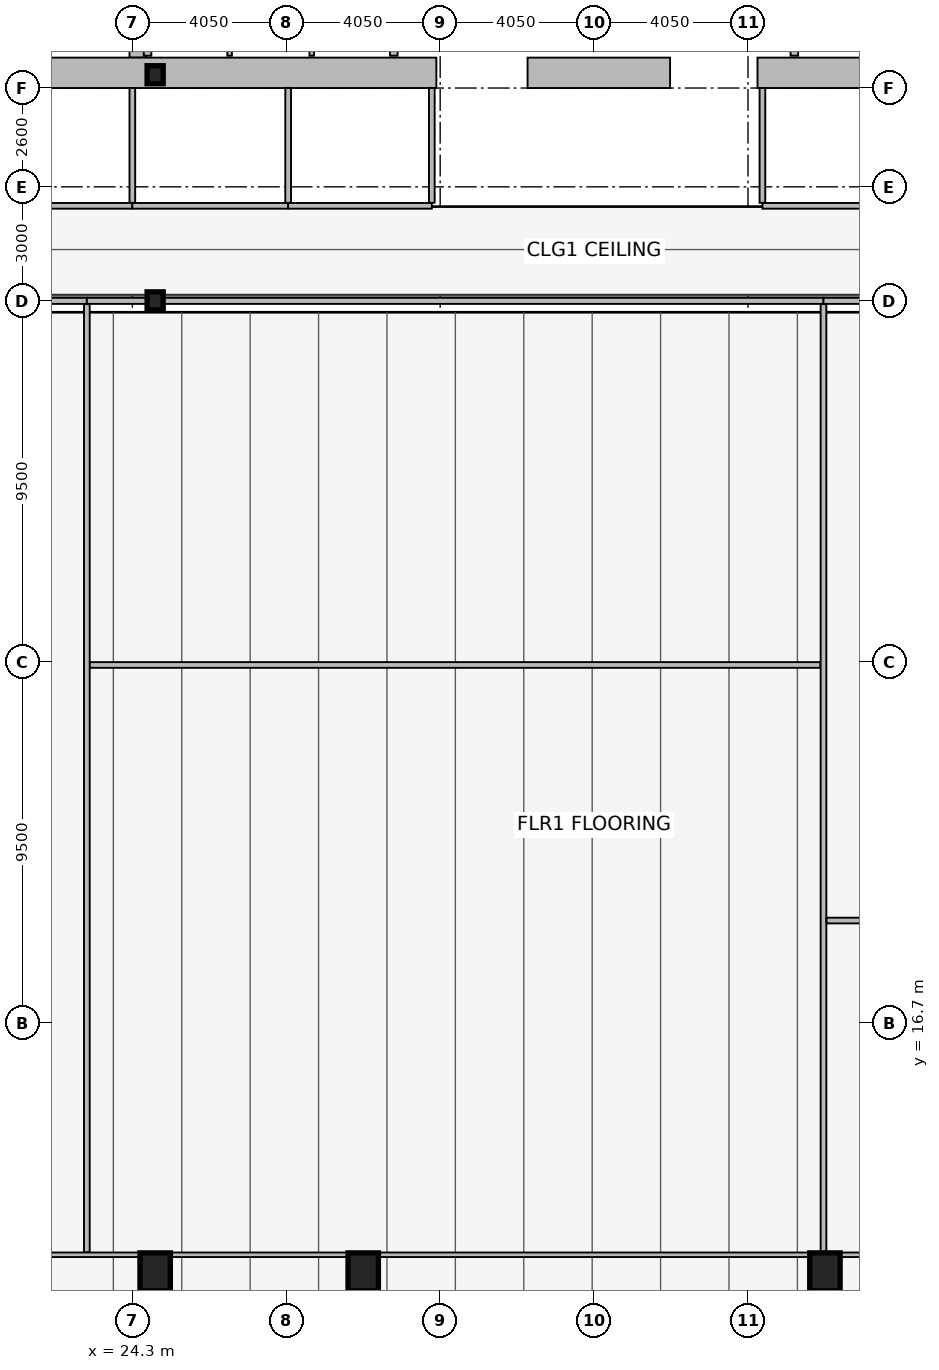
"""IFC4 building model, lengths in metres.
Left out: names, types, materials, properties, quantities, classifications, styles, units other than length and angle.
Written with IfcOpenShell. Run it as: python <this file> out.ifc"""

import sys

from ifc_helpers import new_model, si_unit, direction, frame, frame_2d, origin, origin_2d, place, context, subcontext, project, spatial, rectangle, hollow_rectangle, i_section, extrude, element, fill, save


model = new_model("IFC4")
c1 = context("Model", 3, precision=1e-05, world=origin(), true_north=direction((0.0, 1.0)))
c2 = subcontext(c1, "Body", "Model", "MODEL_VIEW")
j1 = project(units=[si_unit("LENGTHUNIT", "METRE"), si_unit("PLANEANGLEUNIT", "RADIAN")], contexts=[c1])
p1 = place(None, origin())
s1 = spatial("IfcSite", under=j1, at=p1, CompositionType="ELEMENT")
p2 = place(p1, origin())
s2 = spatial("IfcBuilding", under=s1, at=p2, CompositionType="ELEMENT")
p3 = place(p2, frame((0.0, 0.0, 25.8)))
s3 = spatial("IfcBuildingStorey", under=s2, at=p3, CompositionType="ELEMENT", Elevation=25.8)
p4 = place(p3, frame((24.45, 42.1, 0.0), z_axis=(0.0, 0.0, 1.0), x_axis=(0.0, 1.0, 0.0)))
e1 = element("IfcWall", 1, at=p4, inside=s3, PredefinedType="SHEAR", context=c2, shape_type="SweptSolid", body=[
    extrude(rectangle(XDim=10.8, YDim=0.45, at=frame_2d((5.4, 0.0))), origin(), (0.0, 0.0, 1.0), 3.82),
])
p5 = place(p3, frame((32.3, 41.7, 0.0), z_axis=(0.0, 0.0, 1.0), x_axis=(-1.0, 0.0, 0.0)))
e2 = element("IfcWall", 2, at=p5, inside=s3, PredefinedType="SHEAR", context=c2, shape_type="SweptSolid", body=[
    extrude(rectangle(XDim=11.45, YDim=0.8, at=frame_2d((5.725, 0.0))), origin(), (0.0, 0.0, 1.0), 3.82),
])
p6 = place(p3, frame((38.45, 41.7, 0.0), z_axis=(0.0, 0.0, 1.0), x_axis=(-1.0, 0.0, 0.0)))
e3 = element("IfcWall", 3, at=p6, inside=s3, PredefinedType="SHEAR", context=c2, shape_type="SweptSolid", body=[
    extrude(rectangle(XDim=3.75, YDim=0.8, at=frame_2d((1.875, 0.0))), origin(), (0.0, 0.0, 1.0), 3.82),
])
p7 = place(p3, frame((52.05, 41.7, 0.0), z_axis=(0.0, 0.0, 1.0), x_axis=(-1.0, 0.0, 0.0)))
e4 = element("IfcWall", 4, at=p7, inside=s3, PredefinedType="SHEAR", context=c2, shape_type="SweptSolid", body=[
    extrude(rectangle(XDim=11.3, YDim=0.8, at=frame_2d((5.65, 0.0))), origin(), (0.0, 0.0, 1.0), 3.82),
])
for number, where, z_axis, x_axis in (
    (5, (24.9, 10.15, 0.0), (0.0, 0.0, 1.0), (1.0, 0.0, 0.0)),
    (6, (30.375, 10.15, 0.0), (0.0, 0.0, 1.0), (1.0, 0.0, 0.0)),
    (7, (42.525, 10.15, 0.0), (0.0, 0.0, 1.0), (1.0, 0.0, 0.0)),
):
    element("IfcColumn", number, at=place(p3, frame(where, z_axis=z_axis, x_axis=x_axis)), inside=s3, PredefinedType="COLUMN", context=c2, shape_type="SweptSolid", body=[
        extrude(hollow_rectangle(XDim=0.8, YDim=1.0, WallThickness=0.055, at=origin_2d()), origin(), (0.0, 0.0, 1.0), 4.0),
    ])
for number, where, z_axis, x_axis in (
    (8, (24.9, 35.7, 0.0), (0.0, 0.0, 1.0), (1.0, 0.0, 0.0)),
    (9, (24.9, 41.65, 0.0), (0.0, 0.0, 1.0), (1.0, 0.0, 0.0)),
):
    element("IfcColumn", number, at=place(p3, frame(where, z_axis=z_axis, x_axis=x_axis)), inside=s3, PredefinedType="COLUMN", context=c2, shape_type="SweptSolid", body=[
        extrude(i_section(OverallWidth=0.424, OverallDepth=0.474, WebThickness=0.048, FlangeThickness=0.077, at=origin_2d()), origin(), (0.0, 0.0, 1.0), 4.0),
    ])
for number, where, z_axis, x_axis in (
    (10, (24.7, 42.15, 0.0), (0.0, 0.0, 1.0), (0.0, 1.0, 0.0)),
    (11, (31.18, 42.15, 0.0), (0.0, 0.0, 1.0), (0.0, 1.0, 0.0)),
):
    element("IfcWall", number, at=place(p3, frame(where, z_axis=z_axis, x_axis=x_axis)), inside=s3, PredefinedType="PARTITIONING", context=c2, shape_type="SweptSolid", body=[
        extrude(rectangle(XDim=2.095, YDim=0.2, at=frame_2d((1.048, 0.0))), origin(), (0.0, 0.0, 1.0), 3.82),
    ])
for number, where, z_axis, x_axis in (
    (12, (26.86, 42.15, 0.0), (0.0, 0.0, 1.0), (0.0, 1.0, 0.0)),
    (13, (29.02, 42.15, 0.0), (0.0, 0.0, 1.0), (0.0, 1.0, 0.0)),
):
    element("IfcWall", number, at=place(p3, frame(where, z_axis=z_axis, x_axis=x_axis)), inside=s3, PredefinedType="PARTITIONING", context=c2, shape_type="SweptSolid", body=[
        extrude(rectangle(XDim=2.095, YDim=0.12, at=frame_2d((1.048, 0.0))), origin(), (0.0, 0.0, 1.0), 3.82),
    ])
p8 = place(p3, frame((41.72, 42.15, 0.0), z_axis=(0.0, 0.0, 1.0), x_axis=(0.0, 1.0, 0.0)))
e14 = element("IfcWall", 14, at=p8, inside=s3, PredefinedType="PARTITIONING", context=c2, shape_type="SweptSolid", body=[
    extrude(rectangle(XDim=2.095, YDim=0.2, at=frame_2d((1.048, 0.0))), origin(), (0.0, 0.0, 1.0), 3.82),
])
p9 = place(p3, frame((20.95, 38.2, 0.0), z_axis=(0.0, 0.0, 1.0), x_axis=(1.0, 0.0, 0.0)))
e15 = element("IfcWall", 15, at=p9, inside=s3, PredefinedType="PARTITIONING", context=c2, shape_type="SweptSolid", body=[
    extrude(rectangle(XDim=3.35, YDim=0.15, at=frame_2d((1.675, 0.0))), origin(), (0.0, 0.0, 1.0), 3.82),
])
p10 = place(p9, frame((0.9, 0.0, 0.0)))
e16 = element("IfcOpeningElement", 16, at=p10, cuts=e15, PredefinedType="OPENING", context=c2, shape_type="SweptSolid", body=[
    extrude(rectangle(XDim=0.95, YDim=2.05, at=frame_2d((0.475, 1.025))), frame((0.0, 0.085, 0.0), z_axis=(0.0, -1.0, 0.0), x_axis=(1.0, 0.0, 0.0)), (0.0, 0.0, 1.0), 0.17),
])
p11 = place(p3, frame((24.3, 38.2, 0.0), z_axis=(0.0, 0.0, 1.0), x_axis=(1.0, 0.0, 0.0)))
e17 = element("IfcWall", 17, at=p11, inside=s3, PredefinedType="PARTITIONING", context=c2, shape_type="SweptSolid", body=[
    extrude(rectangle(XDim=4.1, YDim=0.15, at=frame_2d((2.05, 0.0))), origin(), (0.0, 0.0, 1.0), 3.01),
])
p12 = place(p11, frame((0.9, 0.0, 0.0)))
e18 = element("IfcOpeningElement", 18, at=p12, cuts=e17, PredefinedType="OPENING", context=c2, shape_type="SweptSolid", body=[
    extrude(rectangle(XDim=0.95, YDim=2.05, at=frame_2d((0.475, 1.025))), frame((0.0, 0.085, 0.0), z_axis=(0.0, -1.0, 0.0), x_axis=(1.0, 0.0, 0.0)), (0.0, 0.0, 1.0), 0.17),
])
p13 = place(p3, frame((28.4, 38.2, 0.0), z_axis=(0.0, 0.0, 1.0), x_axis=(1.0, 0.0, 0.0)))
e19 = element("IfcWall", 19, at=p13, inside=s3, PredefinedType="PARTITIONING", context=c2, shape_type="SweptSolid", body=[
    extrude(rectangle(XDim=3.78, YDim=0.15, at=frame_2d((1.89, 0.0))), origin(), (0.0, 0.0, 1.0), 3.01),
])
p14 = place(p13, frame((0.7, 0.0, 0.0)))
e20 = element("IfcOpeningElement", 20, at=p14, cuts=e19, PredefinedType="OPENING", context=c2, shape_type="SweptSolid", body=[
    extrude(rectangle(XDim=0.95, YDim=2.05, at=frame_2d((0.475, 1.025))), frame((0.0, 0.085, 0.0), z_axis=(0.0, -1.0, 0.0), x_axis=(1.0, 0.0, 0.0)), (0.0, 0.0, 1.0), 0.17),
])
for number, where, z_axis, x_axis in (
    (21, (24.3, 38.28, 0.0), (0.0, 0.0, 1.0), (0.0, 1.0, 0.0)),
    (22, (28.4, 38.28, 0.0), (0.0, 0.0, 1.0), (0.0, 1.0, 0.0)),
    (23, (32.18, 38.28, 0.0), (0.0, 0.0, 1.0), (0.0, 1.0, 0.0)),
):
    element("IfcWall", number, at=place(p3, frame(where, z_axis=z_axis, x_axis=x_axis)), inside=s3, PredefinedType="PARTITIONING", context=c2, shape_type="SweptSolid", body=[
        extrude(rectangle(XDim=3.02, YDim=0.15, at=frame_2d((1.51, 0.0))), origin(), (0.0, 0.0, 1.0), 3.82),
    ])
p15 = place(p3, frame((40.88, 38.2, 0.0), z_axis=(0.0, 0.0, 1.0), x_axis=(1.0, 0.0, 0.0)))
e24 = element("IfcWall", 24, at=p15, inside=s3, PredefinedType="PARTITIONING", context=c2, shape_type="SweptSolid", body=[
    extrude(rectangle(XDim=3.92, YDim=0.15, at=frame_2d((1.96, 0.0))), origin(), (0.0, 0.0, 1.0), 3.01),
])
p16 = place(p15, frame((1.1, 0.0, 0.0)))
e25 = element("IfcOpeningElement", 25, at=p16, cuts=e24, PredefinedType="OPENING", context=c2, shape_type="SweptSolid", body=[
    extrude(rectangle(XDim=0.9, YDim=2.05, at=frame_2d((0.45, 1.025))), frame((0.0, 0.085, 0.0), z_axis=(0.0, -1.0, 0.0), x_axis=(1.0, 0.0, 0.0)), (0.0, 0.0, 1.0), 0.17),
])
p17 = place(p3, frame((40.88, 38.28, 0.0), z_axis=(0.0, 0.0, 1.0), x_axis=(0.0, 1.0, 0.0)))
e26 = element("IfcWall", 26, at=p17, inside=s3, PredefinedType="PARTITIONING", context=c2, shape_type="SweptSolid", body=[
    extrude(rectangle(XDim=3.02, YDim=0.15, at=frame_2d((1.51, 0.0))), origin(), (0.0, 0.0, 1.0), 3.82),
])
p18 = place(p3, frame((10.005, 35.7, 0.0), z_axis=(0.0, 0.0, 1.0), x_axis=(1.0, 0.0, 0.0)))
e27 = element("IfcWall", 27, at=p18, inside=s3, PredefinedType="PARTITIONING", context=c2, shape_type="SweptSolid", body=[
    extrude(rectangle(XDim=13.098, YDim=0.16, at=frame_2d((6.549, 0.0))), origin(), (0.0, 0.0, 1.0), 3.01),
])
p19 = place(p18, frame((5.501, 0.0, 0.0)))
e28 = element("IfcOpeningElement", 28, at=p19, cuts=e27, PredefinedType="OPENING", context=c2, shape_type="SweptSolid", body=[
    extrude(rectangle(XDim=1.0, YDim=2.05, at=frame_2d((0.5, 1.025))), frame((0.0, 0.09, 0.0), z_axis=(0.0, -1.0, 0.0), x_axis=(1.0, 0.0, 0.0)), (0.0, 0.0, 1.0), 0.18),
])
p20 = place(p3, frame((23.103, 35.7, 0.0), z_axis=(0.0, 0.0, 1.0), x_axis=(1.0, 0.0, 0.0)))
e29 = element("IfcWall", 29, at=p20, inside=s3, PredefinedType="PARTITIONING", context=c2, shape_type="SweptSolid", body=[
    extrude(rectangle(XDim=19.384, YDim=0.16, at=frame_2d((9.692, 0.0))), origin(), (0.0, 0.0, 1.0), 3.01),
])
p21 = place(p20, frame((8.141, 0.0, 0.0)))
e30 = element("IfcOpeningElement", 30, at=p21, cuts=e29, PredefinedType="OPENING", context=c2, shape_type="SweptSolid", body=[
    extrude(rectangle(XDim=1.6, YDim=2.15, at=frame_2d((0.8, 1.075))), frame((0.0, 0.09, 0.0), z_axis=(0.0, -1.0, 0.0), x_axis=(1.0, 0.0, 0.0)), (0.0, 0.0, 1.0), 0.18),
])
p22 = place(p3, frame((23.103, 10.665, 0.0), z_axis=(0.0, 0.0, 1.0), x_axis=(0.0, 1.0, 0.0)))
e31 = element("IfcWall", 31, at=p22, inside=s3, PredefinedType="PARTITIONING", context=c2, shape_type="SweptSolid", body=[
    extrude(rectangle(XDim=24.95, YDim=0.15, at=frame_2d((12.475, 0.0))), origin(), (0.0, 0.0, 1.0), 3.21),
])
p23 = place(p3, frame((23.183, 26.119, 0.0), z_axis=(0.0, 0.0, 1.0), x_axis=(1.0, 0.0, 0.0)))
e32 = element("IfcWall", 32, at=p23, inside=s3, PredefinedType="PARTITIONING", context=c2, shape_type="SweptSolid", body=[
    extrude(rectangle(XDim=19.224, YDim=0.15, at=frame_2d((9.612, 0.0))), origin(), (0.0, 0.0, 1.0), 3.01),
])
p24 = place(p23, frame((8.723, 0.0, 0.0)))
e33 = element("IfcOpeningElement", 33, at=p24, cuts=e32, PredefinedType="OPENING", context=c2, shape_type="SweptSolid", body=[
    extrude(rectangle(XDim=0.9, YDim=2.05, at=frame_2d((0.45, 1.025))), frame((0.0, 0.085, 0.0), z_axis=(0.0, -1.0, 0.0), x_axis=(1.0, 0.0, 0.0)), (0.0, 0.0, 1.0), 0.17),
])
p25 = place(p3, frame((42.487, 35.7, 0.0), z_axis=(0.0, 0.0, 1.0), x_axis=(1.0, 0.0, 0.0)))
e34 = element("IfcWall", 34, at=p25, inside=s3, PredefinedType="PARTITIONING", context=c2, shape_type="SweptSolid", body=[
    extrude(rectangle(XDim=14.205, YDim=0.16, at=frame_2d((7.103, 0.0))), origin(), (0.0, 0.0, 1.0), 3.01),
])
p26 = place(p25, frame((6.216, 0.0, 0.0)))
e35 = element("IfcOpeningElement", 35, at=p26, cuts=e34, PredefinedType="OPENING", context=c2, shape_type="SweptSolid", body=[
    extrude(rectangle(XDim=1.6, YDim=2.15, at=frame_2d((0.8, 1.075))), frame((0.0, 0.09, 0.0), z_axis=(0.0, -1.0, 0.0), x_axis=(1.0, 0.0, 0.0)), (0.0, 0.0, 1.0), 0.18),
])
p27 = place(p3, frame((42.487, 10.665, 0.0), z_axis=(0.0, 0.0, 1.0), x_axis=(0.0, 1.0, 0.0)))
e36 = element("IfcWall", 36, at=p27, inside=s3, PredefinedType="PARTITIONING", context=c2, shape_type="SweptSolid", body=[
    extrude(rectangle(XDim=24.95, YDim=0.15, at=frame_2d((12.475, 0.0))), origin(), (0.0, 0.0, 1.0), 3.01),
])
p28 = place(p3, frame((42.567, 19.395, 0.0), z_axis=(0.0, 0.0, 1.0), x_axis=(1.0, 0.0, 0.0)))
e37 = element("IfcWall", 37, at=p28, inside=s3, PredefinedType="PARTITIONING", context=c2, shape_type="SweptSolid", body=[
    extrude(rectangle(XDim=14.046, YDim=0.15, at=frame_2d((7.023, 0.0))), origin(), (0.0, 0.0, 1.0), 3.01),
])
p29 = place(p28, frame((6.393, 0.0, 0.0)))
e38 = element("IfcOpeningElement", 38, at=p29, cuts=e37, PredefinedType="OPENING", context=c2, shape_type="SweptSolid", body=[
    extrude(rectangle(XDim=0.9, YDim=2.05, at=frame_2d((0.45, 1.025))), frame((0.0, 0.085, 0.0), z_axis=(0.0, -1.0, 0.0), x_axis=(1.0, 0.0, 0.0)), (0.0, 0.0, 1.0), 0.17),
])
p30 = place(p3, frame((2.095, 10.6, 0.0), z_axis=(0.0, 0.0, 1.0), x_axis=(1.0, 0.0, 0.0)))
e39 = element("IfcWall", 39, at=p30, inside=s3, PredefinedType="PARTITIONING", context=c2, shape_type="SweptSolid", body=[
    extrude(rectangle(XDim=68.71, YDim=0.12, at=frame_2d((34.355, 0.0))), origin(), (0.0, 0.0, 1.0), 3.01),
])
p31 = place(p10, origin())
e40 = element("IfcDoor", 40, at=p31, inside=s3, OperationType="SINGLE_SWING_LEFT", PredefinedType="DOOR", context=c2, shape_type="SweptSolid", body=[
    extrude(rectangle(XDim=0.95, YDim=2.05, at=frame_2d((0.475, 1.025))), frame((0.0, 0.025, 0.0), z_axis=(0.0, -1.0, 0.0), x_axis=(1.0, 0.0, 0.0)), (0.0, 0.0, 1.0), 0.05),
])
fill(e16, e40)
p32 = place(p12, origin())
e41 = element("IfcDoor", 41, at=p32, inside=s3, OperationType="SINGLE_SWING_RIGHT", PredefinedType="DOOR", context=c2, shape_type="SweptSolid", body=[
    extrude(rectangle(XDim=0.95, YDim=2.05, at=frame_2d((0.475, 1.025))), frame((0.0, 0.025, 0.0), z_axis=(0.0, -1.0, 0.0), x_axis=(1.0, 0.0, 0.0)), (0.0, 0.0, 1.0), 0.05),
])
fill(e18, e41)
p33 = place(p14, origin())
e42 = element("IfcDoor", 42, at=p33, inside=s3, OperationType="SINGLE_SWING_LEFT", PredefinedType="DOOR", context=c2, shape_type="SweptSolid", body=[
    extrude(rectangle(XDim=0.95, YDim=2.05, at=frame_2d((0.475, 1.025))), frame((0.0, 0.025, 0.0), z_axis=(0.0, -1.0, 0.0), x_axis=(1.0, 0.0, 0.0)), (0.0, 0.0, 1.0), 0.05),
])
fill(e20, e42)
p34 = place(p16, origin())
e43 = element("IfcDoor", 43, at=p34, inside=s3, OperationType="SINGLE_SWING_RIGHT", PredefinedType="DOOR", context=c2, shape_type="SweptSolid", body=[
    extrude(rectangle(XDim=0.9, YDim=2.05, at=frame_2d((0.45, 1.025))), frame((0.0, 0.025, 0.0), z_axis=(0.0, -1.0, 0.0), x_axis=(1.0, 0.0, 0.0)), (0.0, 0.0, 1.0), 0.05),
])
fill(e25, e43)
p35 = place(p21, origin())
e44 = element("IfcDoor", 44, at=p35, inside=s3, OperationType="DOUBLE_DOOR_SINGLE_SWING", PredefinedType="DOOR", context=c2, shape_type="SweptSolid", body=[
    extrude(rectangle(XDim=1.6, YDim=2.15, at=frame_2d((0.8, 1.075))), frame((0.0, 0.025, 0.0), z_axis=(0.0, -1.0, 0.0), x_axis=(1.0, 0.0, 0.0)), (0.0, 0.0, 1.0), 0.05),
])
fill(e30, e44)
p36 = place(p24, origin())
e45 = element("IfcDoor", 45, at=p36, inside=s3, OperationType="SINGLE_SWING_LEFT", PredefinedType="DOOR", context=c2, shape_type="SweptSolid", body=[
    extrude(rectangle(XDim=0.9, YDim=2.05, at=frame_2d((0.45, 1.025))), frame((0.0, 0.025, 0.0), z_axis=(0.0, -1.0, 0.0), x_axis=(1.0, 0.0, 0.0)), (0.0, 0.0, 1.0), 0.05),
])
fill(e33, e45)
save(model, sys.argv[1])
